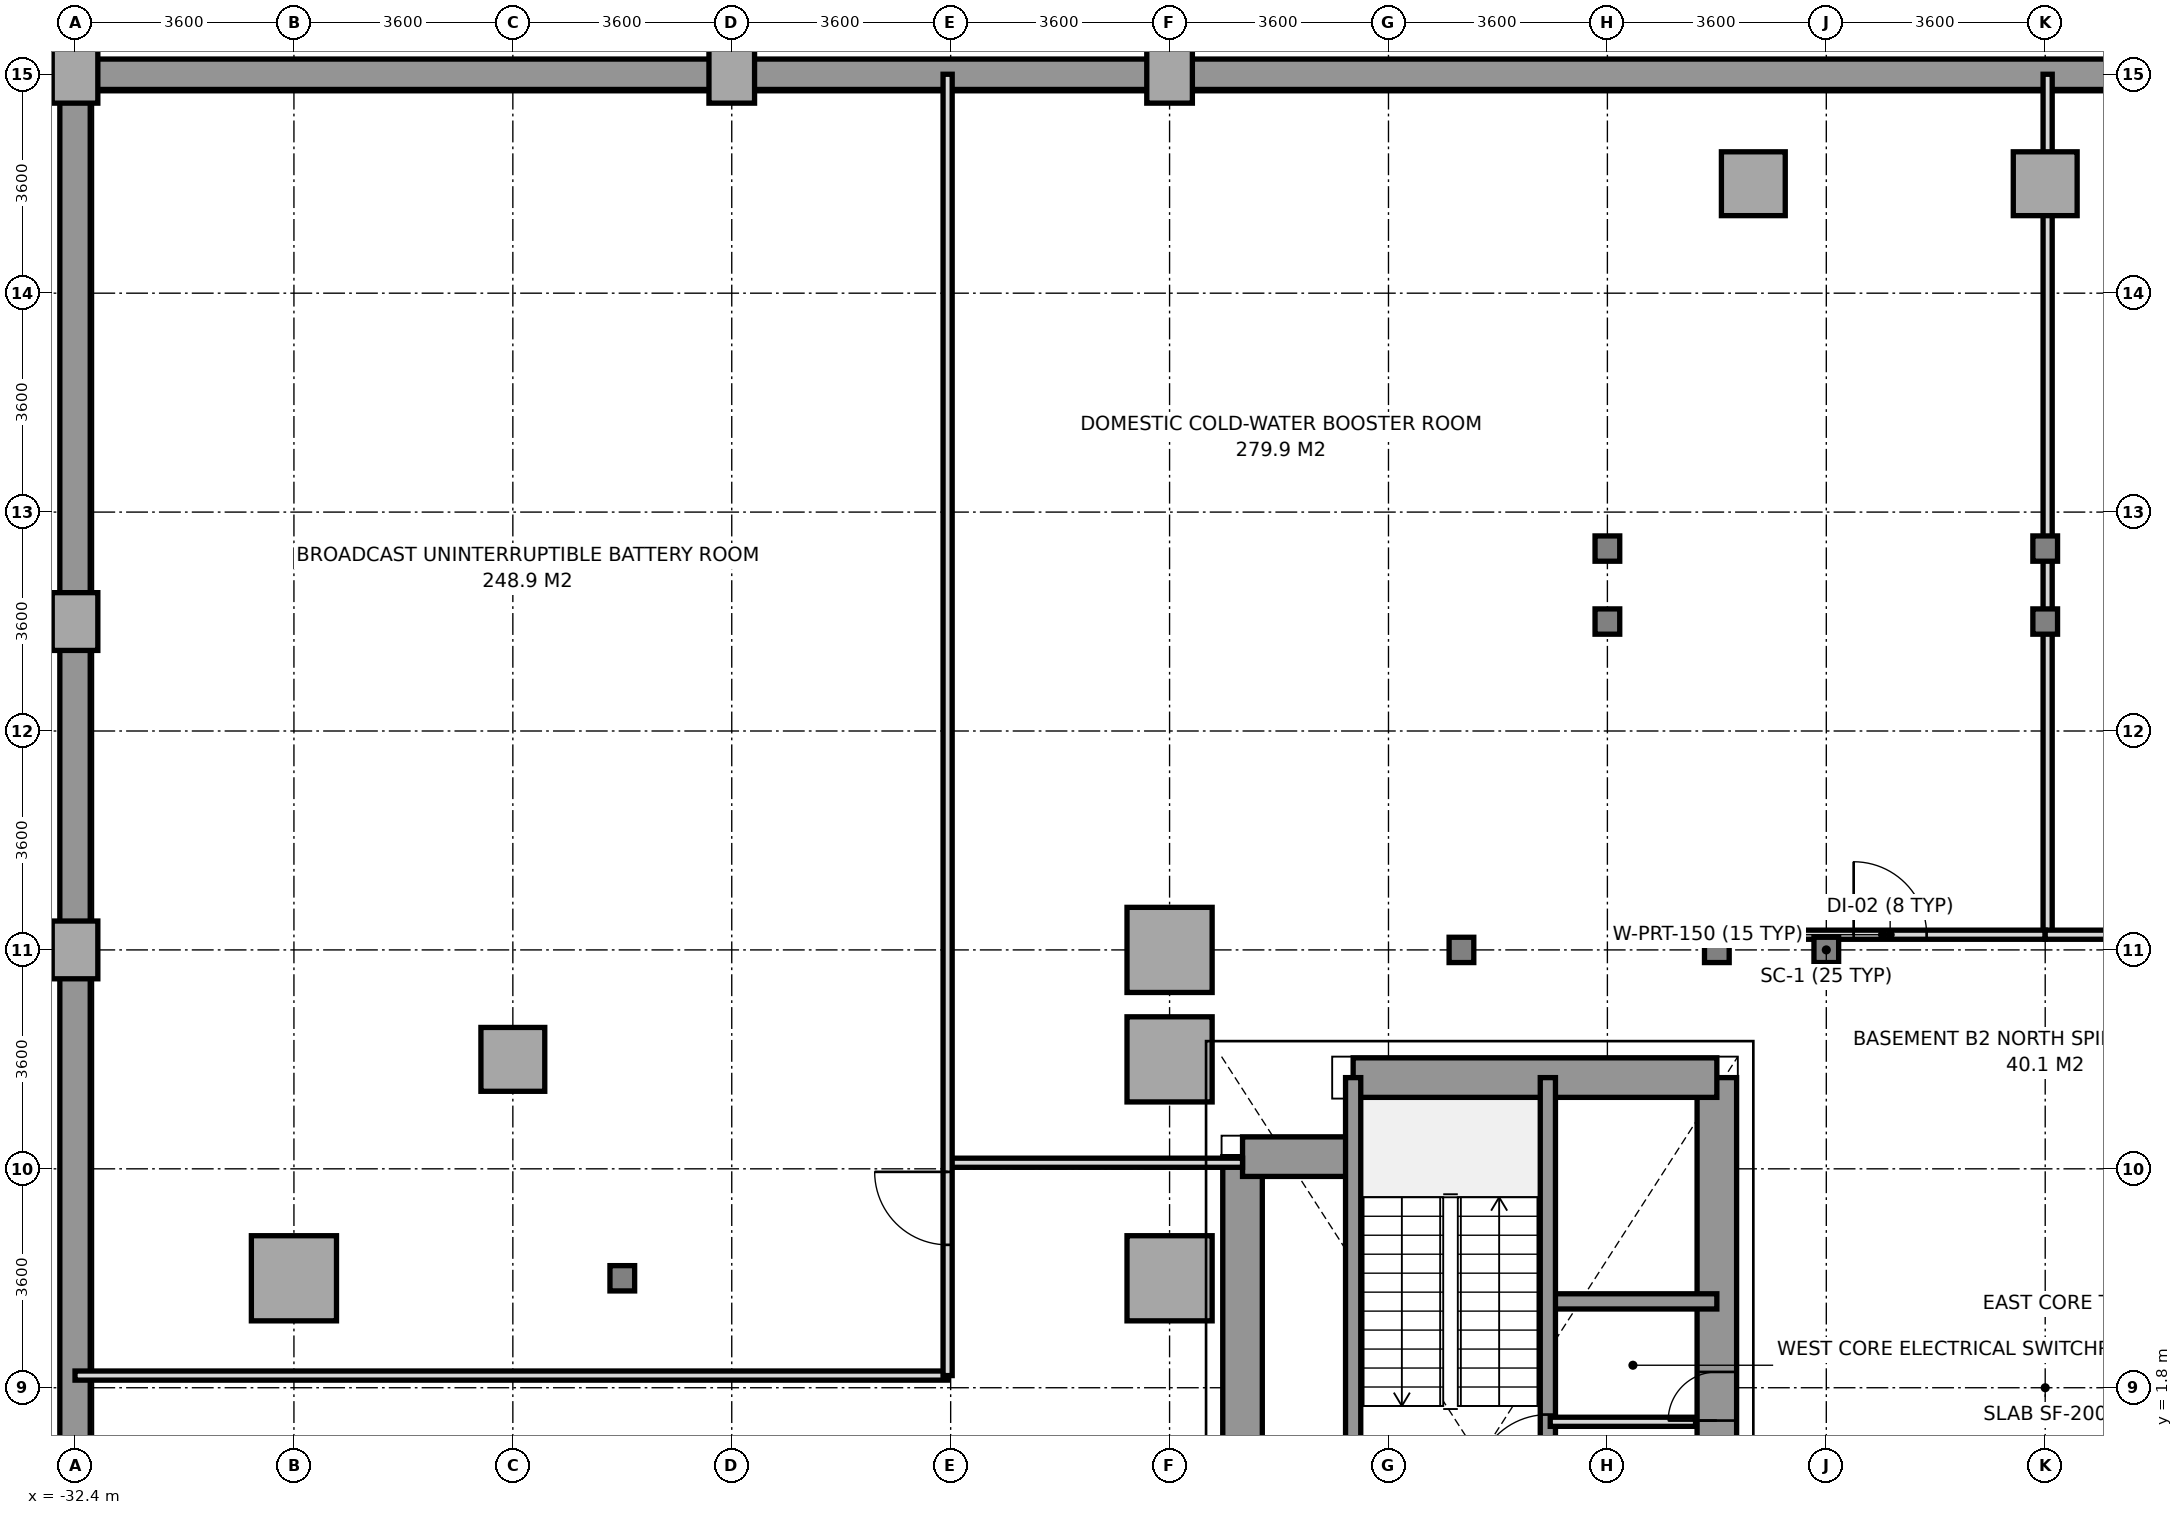
"""IFC4 building model, lengths in metres.
Left out: names, types, materials, properties, quantities, classifications, styles, units other than length and angle.
Written with IfcOpenShell. Run it as: python <this file> out.ifc"""

import sys

from ifc_helpers import new_model, si_unit, direction, frame, frame_2d, origin, origin_2d, place, context, subcontext, project, spatial, rectangle, i_section, extrude, source, transform, mapped, element, fill, save


model = new_model("IFC4")
c1 = context("Model", 3, precision=1e-05, world=origin(), true_north=direction((0.0, 1.0)))
c2 = subcontext(c1, "Body", "Model", "MODEL_VIEW")
j1 = project(units=[si_unit("LENGTHUNIT", "METRE"), si_unit("PLANEANGLEUNIT", "RADIAN")], contexts=[c1])
p1 = place(None, origin())
s1 = spatial("IfcSite", under=j1, at=p1, CompositionType="ELEMENT")
p2 = place(p1, origin())
s2 = spatial("IfcBuilding", under=s1, at=p2, CompositionType="ELEMENT")
p3 = place(p2, frame((0.0, 0.0, -8.4)))
s3 = spatial("IfcBuildingStorey", under=s2, at=p3, CompositionType="ELEMENT", Elevation=-8.4)
m1 = source(origin(), c2, "Body", "SweptSolid", [
    extrude(rectangle(XDim=0.75, YDim=0.95, at=origin_2d()), origin(), (0.0, 0.0, 1.0), 4.12),
])
for number, where, z_axis, x_axis in (
    (1, (-32.4, 9.0, -0.2), (0.0, 0.0, 1.0), (1.0, 0.0, 0.0)),
    (2, (-32.4, 14.4, -0.2), (0.0, 0.0, 1.0), (1.0, 0.0, 0.0)),
    (3, (-32.4, 23.4, -0.2), (0.0, 0.0, 1.0), (1.0, 0.0, 0.0)),
):
    element("IfcColumn", number, at=place(p3, frame(where, z_axis=z_axis, x_axis=x_axis)), inside=s3, PredefinedType="COLUMN", context=c2, shape_type="MappedRepresentation", body=[
        mapped(m1, transform((0.0, 0.0, 0.0), x_axis=(1.0, 0.0, 0.0), y_axis=(0.0, 1.0, 0.0), z_axis=(0.0, 0.0, 1.0), scale=1.0)),
    ])
m2 = source(origin(), c2, "Body", "SweptSolid", [
    extrude(rectangle(XDim=1.4, YDim=1.4, at=origin_2d()), origin(), (0.0, 0.0, 1.0), 4.12),
])
p4 = place(p3, frame((-28.8, 3.6, -0.2), z_axis=(0.0, 0.0, 1.0), x_axis=(1.0, 0.0, 0.0)))
e4 = element("IfcColumn", 4, at=p4, inside=s3, PredefinedType="COLUMN", context=c2, shape_type="MappedRepresentation", body=[
    mapped(m2, transform((0.0, 0.0, 0.0), x_axis=(1.0, 0.0, 0.0), y_axis=(0.0, 1.0, 0.0), z_axis=(0.0, 0.0, 1.0), scale=1.0)),
])
m3 = source(origin(), c2, "Body", "SweptSolid", [
    extrude(rectangle(XDim=1.05, YDim=1.05, at=origin_2d()), origin(), (0.0, 0.0, 1.0), 4.12),
])
p5 = place(p3, frame((-25.2, 7.2, -0.2), z_axis=(0.0, 0.0, 1.0), x_axis=(1.0, 0.0, 0.0)))
e5 = element("IfcColumn", 5, at=p5, inside=s3, PredefinedType="COLUMN", context=c2, shape_type="MappedRepresentation", body=[
    mapped(m3, transform((0.0, 0.0, 0.0), x_axis=(1.0, 0.0, 0.0), y_axis=(0.0, 1.0, 0.0), z_axis=(0.0, 0.0, 1.0), scale=1.0)),
])
m4 = source(origin(), c2, "Body", "SweptSolid", [
    extrude(i_section(OverallWidth=0.406, OverallDepth=0.416, WebThickness=0.024, FlangeThickness=0.039, at=origin_2d()), origin(), (0.0, 0.0, 1.0), 4.12),
])
p6 = place(p3, frame((-23.4, 3.6, -0.2), z_axis=(0.0, 0.0, 1.0), x_axis=(1.0, 0.0, 0.0)))
e6 = element("IfcColumn", 6, at=p6, inside=s3, PredefinedType="COLUMN", context=c2, shape_type="MappedRepresentation", body=[
    mapped(m4, transform((0.0, 0.0, 0.0), x_axis=(1.0, 0.0, 0.0), y_axis=(0.0, 1.0, 0.0), z_axis=(0.0, 0.0, 1.0), scale=1.0)),
])
p7 = place(p3, frame((-21.6, 23.4, -0.2), z_axis=(0.0, 0.0, 1.0), x_axis=(1.0, 0.0, 0.0)))
e7 = element("IfcColumn", 7, at=p7, inside=s3, PredefinedType="COLUMN", context=c2, shape_type="MappedRepresentation", body=[
    mapped(m1, transform((0.0, 0.0, 0.0), x_axis=(1.0, 0.0, 0.0), y_axis=(0.0, 1.0, 0.0), z_axis=(0.0, 0.0, 1.0), scale=1.0)),
])
for number, where, z_axis, x_axis in (
    (8, (-14.4, 3.6, -0.2), (0.0, 0.0, 1.0), (1.0, 0.0, 0.0)),
    (9, (-14.4, 7.2, -0.2), (0.0, 0.0, 1.0), (1.0, 0.0, 0.0)),
    (10, (-14.4, 9.0, -0.2), (0.0, 0.0, 1.0), (1.0, 0.0, 0.0)),
):
    element("IfcColumn", number, at=place(p3, frame(where, z_axis=z_axis, x_axis=x_axis)), inside=s3, PredefinedType="COLUMN", context=c2, shape_type="MappedRepresentation", body=[
        mapped(m2, transform((0.0, 0.0, 0.0), x_axis=(1.0, 0.0, 0.0), y_axis=(0.0, 1.0, 0.0), z_axis=(0.0, 0.0, 1.0), scale=1.0)),
    ])
p8 = place(p3, frame((-14.4, 23.4, -0.2), z_axis=(0.0, 0.0, 1.0), x_axis=(1.0, 0.0, 0.0)))
e11 = element("IfcColumn", 11, at=p8, inside=s3, PredefinedType="COLUMN", context=c2, shape_type="MappedRepresentation", body=[
    mapped(m1, transform((0.0, 0.0, 0.0), x_axis=(1.0, 0.0, 0.0), y_axis=(0.0, 1.0, 0.0), z_axis=(0.0, 0.0, 1.0), scale=1.0)),
])
for number, where, z_axis, x_axis in (
    (12, (-9.6, 9.0, -0.2), (0.0, 0.0, 1.0), (1.0, 0.0, 0.0)),
    (13, (-7.2, 14.4, -0.2), (0.0, 0.0, 1.0), (1.0, 0.0, 0.0)),
    (14, (-7.2, 15.6, -0.2), (0.0, 0.0, 1.0), (1.0, 0.0, 0.0)),
    (15, (-5.4, 9.0, -0.2), (0.0, 0.0, 1.0), (1.0, 0.0, 0.0)),
):
    element("IfcColumn", number, at=place(p3, frame(where, z_axis=z_axis, x_axis=x_axis)), inside=s3, PredefinedType="COLUMN", context=c2, shape_type="MappedRepresentation", body=[
        mapped(m4, transform((0.0, 0.0, 0.0), x_axis=(1.0, 0.0, 0.0), y_axis=(0.0, 1.0, 0.0), z_axis=(0.0, 0.0, 1.0), scale=1.0)),
    ])
p9 = place(p3, frame((-4.8, 21.6, -0.2), z_axis=(0.0, 0.0, 1.0), x_axis=(1.0, 0.0, 0.0)))
e16 = element("IfcColumn", 16, at=p9, inside=s3, PredefinedType="COLUMN", context=c2, shape_type="MappedRepresentation", body=[
    mapped(m3, transform((0.0, 0.0, 0.0), x_axis=(1.0, 0.0, 0.0), y_axis=(0.0, 1.0, 0.0), z_axis=(0.0, 0.0, 1.0), scale=1.0)),
])
for number, where, z_axis, x_axis in (
    (17, (-3.6, 9.0, -0.2), (0.0, 0.0, 1.0), (1.0, 0.0, 0.0)),
    (18, (0.0, 14.4, -0.2), (0.0, 0.0, 1.0), (1.0, 0.0, 0.0)),
    (19, (0.0, 15.6, -0.2), (0.0, 0.0, 1.0), (1.0, 0.0, 0.0)),
):
    element("IfcColumn", number, at=place(p3, frame(where, z_axis=z_axis, x_axis=x_axis)), inside=s3, PredefinedType="COLUMN", context=c2, shape_type="MappedRepresentation", body=[
        mapped(m4, transform((0.0, 0.0, 0.0), x_axis=(1.0, 0.0, 0.0), y_axis=(0.0, 1.0, 0.0), z_axis=(0.0, 0.0, 1.0), scale=1.0)),
    ])
p10 = place(p3, frame((0.0, 21.6, -0.2), z_axis=(0.0, 0.0, 1.0), x_axis=(1.0, 0.0, 0.0)))
e20 = element("IfcColumn", 20, at=p10, inside=s3, PredefinedType="COLUMN", context=c2, shape_type="MappedRepresentation", body=[
    mapped(m3, transform((0.0, 0.0, 0.0), x_axis=(1.0, 0.0, 0.0), y_axis=(0.0, 1.0, 0.0), z_axis=(0.0, 0.0, 1.0), scale=1.0)),
])
p11 = place(p3, frame((32.4, 23.4, -0.2), z_axis=(0.0, 0.0, 1.0), x_axis=(-1.0, 0.0, 0.0)))
e21 = element("IfcWall", 21, at=p11, inside=s3, PredefinedType="USERDEFINED", context=c2, shape_type="SweptSolid", body=[
    extrude(rectangle(XDim=64.8, YDim=0.5, at=frame_2d((32.4, 0.0))), origin(), (0.0, 0.0, 1.0), 4.12),
])
p12 = place(p3, frame((-32.4, 23.4, -0.2), z_axis=(0.0, 0.0, 1.0), x_axis=(0.0, -1.0, 0.0)))
e22 = element("IfcWall", 22, at=p12, inside=s3, PredefinedType="USERDEFINED", context=c2, shape_type="SweptSolid", body=[
    extrude(rectangle(XDim=43.2, YDim=0.5, at=frame_2d((21.6, 0.0))), origin(), (0.0, 0.0, 1.0), 4.12),
])
p13 = place(p3, frame((-13.2, -5.6, -0.2), z_axis=(0.0, 0.0, 1.0), x_axis=(0.0, 1.0, 0.0)))
e23 = element("IfcWall", 23, at=p13, inside=s3, PredefinedType="SHEAR", context=c2, shape_type="SweptSolid", body=[
    extrude(rectangle(XDim=11.2, YDim=0.65, at=frame_2d((5.6, 0.0))), origin(), (0.0, 0.0, 1.0), 4.12),
])
p14 = place(p3, frame((-5.4, -5.6, -0.2), z_axis=(0.0, 0.0, 1.0), x_axis=(0.0, 1.0, 0.0)))
e24 = element("IfcWall", 24, at=p14, inside=s3, PredefinedType="SHEAR", context=c2, shape_type="SweptSolid", body=[
    extrude(rectangle(XDim=12.5, YDim=0.65, at=frame_2d((6.25, 0.0))), origin(), (0.0, 0.0, 1.0), 4.12),
])
p15 = place(p14, frame((4.55, 0.0, 0.2)))
e25 = element("IfcOpeningElement", 25, at=p15, cuts=e24, PredefinedType="OPENING", context=c2, shape_type="SweptSolid", body=[
    extrude(rectangle(XDim=1.2, YDim=2.2, at=frame_2d((0.6, 1.1))), frame((0.0, 0.335, 0.0), z_axis=(0.0, -1.0, 0.0), x_axis=(1.0, 0.0, 0.0)), (0.0, 0.0, 1.0), 0.67),
])
p16 = place(p14, frame((6.86, 0.0, 0.2)))
e26 = element("IfcOpeningElement", 26, at=p16, cuts=e24, PredefinedType="OPENING", context=c2, shape_type="SweptSolid", body=[
    extrude(rectangle(XDim=0.8, YDim=2.1, at=frame_2d((0.4, 1.05))), frame((0.0, 0.335, 0.0), z_axis=(0.0, -1.0, 0.0), x_axis=(1.0, 0.0, 0.0)), (0.0, 0.0, 1.0), 0.67),
])
p17 = place(p3, frame((-11.381, 6.9, -0.2), z_axis=(0.0, 0.0, 1.0), x_axis=(1.0, 0.0, 0.0)))
e27 = element("IfcWall", 27, at=p17, inside=s3, PredefinedType="SHEAR", context=c2, shape_type="SweptSolid", body=[
    extrude(rectangle(XDim=5.981, YDim=0.65, at=frame_2d((2.991, 0.0))), origin(), (0.0, 0.0, 1.0), 4.12),
])
p18 = place(p3, frame((-13.2, 5.6, -0.2), z_axis=(0.0, 0.0, 1.0), x_axis=(1.0, 0.0, 0.0)))
e28 = element("IfcWall", 28, at=p18, inside=s3, PredefinedType="SHEAR", context=c2, shape_type="SweptSolid", body=[
    extrude(rectangle(XDim=1.819, YDim=0.65, at=frame_2d((0.909, 0.0))), origin(), (0.0, 0.0, 1.0), 4.12),
])
p19 = place(p3, frame((-8.18, 3.22, -0.2), z_axis=(0.0, 0.0, 1.0), x_axis=(1.0, 0.0, 0.0)))
e29 = element("IfcWall", 29, at=p19, inside=s3, PredefinedType="SOLIDWALL", context=c2, shape_type="SweptSolid", body=[
    extrude(rectangle(XDim=2.78, YDim=0.25, at=frame_2d((1.39, 0.0))), origin(), (0.0, 0.0, 1.0), 4.12),
])
p20 = place(p3, frame((-8.179, -0.041, -0.2), z_axis=(0.0, 0.0, 1.0), x_axis=(0.0, 1.0, 0.0)))
e30 = element("IfcWall", 30, at=p20, inside=s3, PredefinedType="SOLIDWALL", context=c2, shape_type="SweptSolid", body=[
    extrude(rectangle(XDim=6.941, YDim=0.25, at=frame_2d((3.47, 0.0))), origin(), (0.0, 0.0, 1.0), 4.12),
])
p21 = place(p20, frame((0.2, 0.0, 0.2)))
e31 = element("IfcOpeningElement", 31, at=p21, cuts=e30, PredefinedType="OPENING", context=c2, shape_type="SweptSolid", body=[
    extrude(rectangle(XDim=1.2, YDim=2.2, at=frame_2d((0.6, 1.1))), frame((0.0, 0.135, 0.0), z_axis=(0.0, -1.0, 0.0), x_axis=(1.0, 0.0, 0.0)), (0.0, 0.0, 1.0), 0.27),
])
p22 = place(p3, frame((-11.381, -0.041, -0.2), z_axis=(0.0, 0.0, 1.0), x_axis=(0.0, 1.0, 0.0)))
e32 = element("IfcWall", 32, at=p22, inside=s3, PredefinedType="SOLIDWALL", context=c2, shape_type="SweptSolid", body=[
    extrude(rectangle(XDim=6.941, YDim=0.25, at=frame_2d((3.47, 0.0))), origin(), (0.0, 0.0, 1.0), 4.12),
])
p23 = place(p3, frame((-8.14, 1.24, 0.0), z_axis=(0.0, 0.0, 1.0), x_axis=(1.0, 0.0, 0.0)))
e33 = element("IfcWall", 33, at=p23, inside=s3, PredefinedType="PARTITIONING", context=c2, shape_type="SweptSolid", body=[
    extrude(rectangle(XDim=2.39, YDim=0.15, at=frame_2d((1.195, 0.0))), origin(), (0.0, 0.0, 1.0), 3.02),
])
p24 = place(p3, frame((-18.05, 5.5, 0.0), z_axis=(0.0, 0.0, 1.0), x_axis=(1.0, 0.0, 0.0)))
e34 = element("IfcWall", 34, at=p24, inside=s3, PredefinedType="PARTITIONING", context=c2, shape_type="SweptSolid", body=[
    extrude(rectangle(XDim=4.85, YDim=0.15, at=frame_2d((2.425, 0.0))), origin(), (0.0, 0.0, 1.0), 3.33),
])
p25 = place(p3, frame((0.04, 9.25, 0.0), z_axis=(0.0, 0.0, 1.0), x_axis=(0.0, 1.0, 0.0)))
e35 = element("IfcWall", 35, at=p25, inside=s3, PredefinedType="PARTITIONING", context=c2, shape_type="SweptSolid", body=[
    extrude(rectangle(XDim=14.15, YDim=0.15, at=frame_2d((7.075, 0.0))), origin(), (0.0, 0.0, 1.0), 3.27),
])
p26 = place(p3, frame((-32.4, 2.0, 0.0), z_axis=(0.0, 0.0, 1.0), x_axis=(1.0, 0.0, 0.0)))
e36 = element("IfcWall", 36, at=p26, inside=s3, PredefinedType="PARTITIONING", context=c2, shape_type="SweptSolid", body=[
    extrude(rectangle(XDim=14.35, YDim=0.15, at=frame_2d((7.175, 0.0))), origin(), (0.0, 0.0, 1.0), 3.33),
])
p27 = place(p3, frame((-18.05, 2.0, 0.0), z_axis=(0.0, 0.0, 1.0), x_axis=(0.0, 1.0, 0.0)))
e37 = element("IfcWall", 37, at=p27, inside=s3, PredefinedType="PARTITIONING", context=c2, shape_type="SweptSolid", body=[
    extrude(rectangle(XDim=21.4, YDim=0.15, at=frame_2d((10.7, 0.0))), origin(), (0.0, 0.0, 1.0), 3.27),
])
p28 = place(p27, frame((2.15, 0.0, 0.0)))
e38 = element("IfcOpeningElement", 38, at=p28, cuts=e37, PredefinedType="OPENING", context=c2, shape_type="SweptSolid", body=[
    extrude(rectangle(XDim=1.2, YDim=2.2, at=frame_2d((0.6, 1.1))), frame((0.0, 0.085, 0.0), z_axis=(0.0, -1.0, 0.0), x_axis=(1.0, 0.0, 0.0)), (0.0, 0.0, 1.0), 0.17),
])
p29 = place(p3, frame((-5.35, 9.25, 0.0), z_axis=(0.0, 0.0, 1.0), x_axis=(1.0, 0.0, 0.0)))
e39 = element("IfcWall", 39, at=p29, inside=s3, PredefinedType="PARTITIONING", context=c2, shape_type="SweptSolid", body=[
    extrude(rectangle(XDim=5.35, YDim=0.15, at=frame_2d((2.675, 0.0))), origin(), (0.0, 0.0, 1.0), 3.92),
])
p30 = place(p29, frame((2.2, 0.0, 0.0)))
e40 = element("IfcOpeningElement", 40, at=p30, cuts=e39, PredefinedType="OPENING", context=c2, shape_type="SweptSolid", body=[
    extrude(rectangle(XDim=1.2, YDim=2.2, at=frame_2d((0.6, 1.1))), frame((0.0, 0.085, 0.0), z_axis=(0.0, -1.0, 0.0), x_axis=(1.0, 0.0, 0.0)), (0.0, 0.0, 1.0), 0.17),
])
p31 = place(p3, frame((0.0, 9.25, 0.0), z_axis=(0.0, 0.0, 1.0), x_axis=(1.0, 0.0, 0.0)))
e41 = element("IfcWall", 41, at=p31, inside=s3, PredefinedType="PARTITIONING", context=c2, shape_type="SweptSolid", body=[
    extrude(rectangle(XDim=5.35, YDim=0.15, at=frame_2d((2.675, 0.0))), origin(), (0.0, 0.0, 1.0), 3.92),
])
p32 = place(p31, frame((1.85, 0.0, 0.0)))
e42 = element("IfcOpeningElement", 42, at=p32, cuts=e41, PredefinedType="OPENING", context=c2, shape_type="SweptSolid", body=[
    extrude(rectangle(XDim=1.2, YDim=2.2, at=frame_2d((0.6, 1.1))), frame((0.0, 0.085, 0.0), z_axis=(0.0, -1.0, 0.0), x_axis=(1.0, 0.0, 0.0)), (0.0, 0.0, 1.0), 0.17),
])
m5 = source(origin(), c2, "Body", "SweptSolid", [
    extrude(rectangle(XDim=1.2, YDim=2.2, at=frame_2d((0.6, 1.1))), frame((0.0, 0.025, 0.0), z_axis=(0.0, -1.0, 0.0), x_axis=(1.0, 0.0, 0.0)), (0.0, 0.0, 1.0), 0.05),
])
p33 = place(p21, origin())
e43 = element("IfcDoor", 43, at=p33, inside=s3, OperationType="SINGLE_SWING_LEFT", PredefinedType="DOOR", context=c2, shape_type="MappedRepresentation", body=[
    mapped(m5, transform((0.0, 0.0, 0.0), x_axis=(1.0, 0.0, 0.0), y_axis=(0.0, 1.0, 0.0), z_axis=(0.0, 0.0, 1.0), scale=1.0)),
])
fill(e31, e43)
m6 = source(origin(), c2, "Body", "SweptSolid", [
    extrude(rectangle(XDim=0.8, YDim=2.1, at=frame_2d((0.4, 1.05))), frame((0.0, 0.025, 0.0), z_axis=(0.0, -1.0, 0.0), x_axis=(1.0, 0.0, 0.0)), (0.0, 0.0, 1.0), 0.05),
])
p34 = place(p16, origin())
e44 = element("IfcDoor", 44, at=p34, inside=s3, OperationType="SINGLE_SWING_LEFT", PredefinedType="DOOR", context=c2, shape_type="MappedRepresentation", body=[
    mapped(m6, transform((0.0, 0.0, 0.0), x_axis=(1.0, 0.0, 0.0), y_axis=(0.0, 1.0, 0.0), z_axis=(0.0, 0.0, 1.0), scale=1.0)),
])
fill(e26, e44)
p35 = place(p28, origin())
e45 = element("IfcDoor", 45, at=p35, inside=s3, OperationType="SINGLE_SWING_RIGHT", PredefinedType="DOOR", context=c2, shape_type="MappedRepresentation", body=[
    mapped(m5, transform((0.0, 0.0, 0.0), x_axis=(1.0, 0.0, 0.0), y_axis=(0.0, 1.0, 0.0), z_axis=(0.0, 0.0, 1.0), scale=1.0)),
])
fill(e38, e45)
p36 = place(p30, origin())
e46 = element("IfcDoor", 46, at=p36, inside=s3, OperationType="SINGLE_SWING_LEFT", PredefinedType="DOOR", context=c2, shape_type="MappedRepresentation", body=[
    mapped(m5, transform((0.0, 0.0, 0.0), x_axis=(1.0, 0.0, 0.0), y_axis=(0.0, 1.0, 0.0), z_axis=(0.0, 0.0, 1.0), scale=1.0)),
])
fill(e40, e46)
save(model, sys.argv[1])
